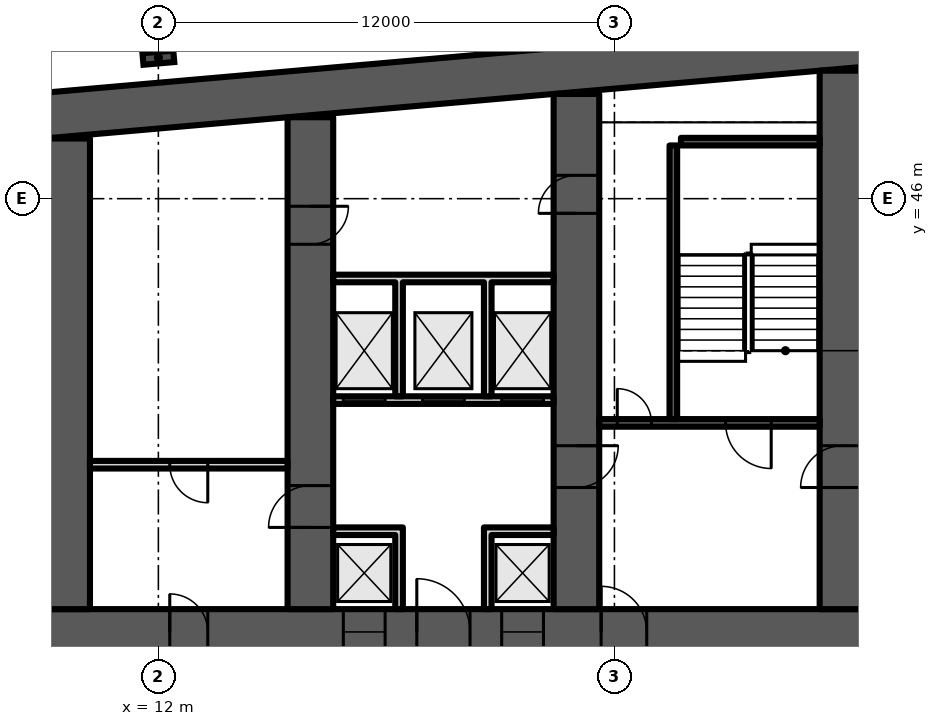
"""IFC4 building model, lengths in metres.
Left out: names, types, materials, properties, quantities, classifications, styles, units other than length and angle.
Written with IfcOpenShell. Run it as: python <this file> out.ifc"""

import sys

from ifc_helpers import new_model, si_unit, direction, frame, frame_2d, origin, origin_2d, place, context, subcontext, project, spatial, polyline, rectangle, i_section, outline, extrude, element, fill, save


model = new_model("IFC4")
c1 = context("Model", 3, precision=1e-05, world=origin(), true_north=direction((0.0, 1.0)))
c2 = subcontext(c1, "Body", "Model", "MODEL_VIEW")
j1 = project(units=[si_unit("LENGTHUNIT", "METRE"), si_unit("PLANEANGLEUNIT", "RADIAN")], contexts=[c1])
p1 = place(None, origin())
s1 = spatial("IfcSite", under=j1, at=p1, CompositionType="ELEMENT")
p2 = place(p1, origin())
s2 = spatial("IfcBuilding", under=s1, at=p2, CompositionType="ELEMENT")
p3 = place(p2, frame((0.0, 0.0, 63.1)))
s3 = spatial("IfcBuildingStorey", under=s2, at=p3, CompositionType="ELEMENT", Elevation=63.1)
p4 = place(p3, frame((0.0, 0.0, -0.0)))
e1 = element("IfcWall", 1, at=p4, inside=s3, PredefinedType="SHEAR", context=c2, shape_type="SweptSolid", body=[
    extrude(outline(polyline([(9.0, 47.583), (37.0, 50.032), (65.0, 47.583), (65.0, 48.787), (37.0, 51.237), (9.0, 48.787), (9.0, 47.583)])), origin(), (0.0, 0.0, 1.0), 3.6),
])
p5 = place(p3, frame((9.0, 34.6, 0.0), z_axis=(0.0, 0.0, 1.0), x_axis=(1.0, 0.0, 0.0)))
e2 = element("IfcWall", 2, at=p5, inside=s3, PredefinedType="SHEAR", context=c2, shape_type="SweptSolid", body=[
    extrude(rectangle(XDim=56.0, YDim=1.2, at=frame_2d((28.0, 0.0))), origin(), (0.0, 0.0, 1.0), 3.6),
])
p6 = place(p5, frame((3.3, 0.0, 0.0)))
e3 = element("IfcOpeningElement", 3, at=p6, cuts=e2, PredefinedType="OPENING", context=c2, shape_type="SweptSolid", body=[
    extrude(rectangle(XDim=1.0, YDim=2.1, at=frame_2d((0.5, 1.05))), frame((0.0, 0.61, 0.0), z_axis=(0.0, -1.0, 0.0), x_axis=(1.0, 0.0, 0.0)), (0.0, 0.0, 1.0), 1.22),
])
p7 = place(p5, frame((7.867, 0.0, 0.0)))
e4 = element("IfcOpeningElement", 4, at=p7, cuts=e2, PredefinedType="OPENING", context=c2, shape_type="SweptSolid", body=[
    extrude(rectangle(XDim=1.1, YDim=2.1, at=frame_2d((0.55, 1.05))), frame((0.0, 0.61, 0.0), z_axis=(0.0, -1.0, 0.0), x_axis=(1.0, 0.0, 0.0)), (0.0, 0.0, 1.0), 1.22),
])
p8 = place(p5, frame((12.033, 0.0, 0.0)))
e5 = element("IfcOpeningElement", 5, at=p8, cuts=e2, PredefinedType="OPENING", context=c2, shape_type="SweptSolid", body=[
    extrude(rectangle(XDim=1.1, YDim=2.1, at=frame_2d((0.55, 1.05))), frame((0.0, 0.61, 0.0), z_axis=(0.0, -1.0, 0.0), x_axis=(1.0, 0.0, 0.0)), (0.0, 0.0, 1.0), 1.22),
])
p9 = place(p5, frame((9.8, 0.0, 0.0)))
e6 = element("IfcOpeningElement", 6, at=p9, cuts=e2, PredefinedType="OPENING", context=c2, shape_type="SweptSolid", body=[
    extrude(rectangle(XDim=1.4, YDim=2.1, at=frame_2d((0.7, 1.05))), frame((0.0, 0.61, 0.0), z_axis=(0.0, -1.0, 0.0), x_axis=(1.0, 0.0, 0.0)), (0.0, 0.0, 1.0), 1.22),
])
p10 = place(p5, frame((14.65, 0.0, 0.0)))
e7 = element("IfcOpeningElement", 7, at=p10, cuts=e2, PredefinedType="OPENING", context=c2, shape_type="SweptSolid", body=[
    extrude(rectangle(XDim=1.2, YDim=2.1, at=frame_2d((0.6, 1.05))), frame((0.0, 0.61, 0.0), z_axis=(0.0, -1.0, 0.0), x_axis=(1.0, 0.0, 0.0)), (0.0, 0.0, 1.0), 1.22),
])
p11 = place(p5, frame((21.867, 0.0, 0.0)))
e8 = element("IfcOpeningElement", 8, at=p11, cuts=e2, PredefinedType="OPENING", context=c2, shape_type="SweptSolid", body=[
    extrude(rectangle(XDim=1.1, YDim=2.1, at=frame_2d((0.55, 1.05))), frame((0.0, 0.61, 0.0), z_axis=(0.0, -1.0, 0.0), x_axis=(1.0, 0.0, 0.0)), (0.0, 0.0, 1.0), 1.22),
])
p12 = place(p5, frame((26.033, 0.0, 0.0)))
e9 = element("IfcOpeningElement", 9, at=p12, cuts=e2, PredefinedType="OPENING", context=c2, shape_type="SweptSolid", body=[
    extrude(rectangle(XDim=1.1, YDim=2.1, at=frame_2d((0.55, 1.05))), frame((0.0, 0.61, 0.0), z_axis=(0.0, -1.0, 0.0), x_axis=(1.0, 0.0, 0.0)), (0.0, 0.0, 1.0), 1.22),
])
p13 = place(p5, frame((23.8, 0.0, 0.0)))
e10 = element("IfcOpeningElement", 10, at=p13, cuts=e2, PredefinedType="OPENING", context=c2, shape_type="SweptSolid", body=[
    extrude(rectangle(XDim=1.4, YDim=2.1, at=frame_2d((0.7, 1.05))), frame((0.0, 0.61, 0.0), z_axis=(0.0, -1.0, 0.0), x_axis=(1.0, 0.0, 0.0)), (0.0, 0.0, 1.0), 1.22),
])
p14 = place(p5, frame((28.867, 0.0, 0.0)))
e11 = element("IfcOpeningElement", 11, at=p14, cuts=e2, PredefinedType="OPENING", context=c2, shape_type="SweptSolid", body=[
    extrude(rectangle(XDim=1.1, YDim=2.1, at=frame_2d((0.55, 1.05))), frame((0.0, 0.61, 0.0), z_axis=(0.0, -1.0, 0.0), x_axis=(1.0, 0.0, 0.0)), (0.0, 0.0, 1.0), 1.22),
])
p15 = place(p5, frame((33.033, 0.0, 0.0)))
e12 = element("IfcOpeningElement", 12, at=p15, cuts=e2, PredefinedType="OPENING", context=c2, shape_type="SweptSolid", body=[
    extrude(rectangle(XDim=1.1, YDim=2.1, at=frame_2d((0.55, 1.05))), frame((0.0, 0.61, 0.0), z_axis=(0.0, -1.0, 0.0), x_axis=(1.0, 0.0, 0.0)), (0.0, 0.0, 1.0), 1.22),
])
p16 = place(p5, frame((40.15, 0.0, 0.0)))
e13 = element("IfcOpeningElement", 13, at=p16, cuts=e2, PredefinedType="OPENING", context=c2, shape_type="SweptSolid", body=[
    extrude(rectangle(XDim=1.2, YDim=2.1, at=frame_2d((0.6, 1.05))), frame((0.0, 0.61, 0.0), z_axis=(0.0, -1.0, 0.0), x_axis=(1.0, 0.0, 0.0)), (0.0, 0.0, 1.0), 1.22),
])
p17 = place(p5, frame((44.8, 0.0, 0.0)))
e14 = element("IfcOpeningElement", 14, at=p17, cuts=e2, PredefinedType="OPENING", context=c2, shape_type="SweptSolid", body=[
    extrude(rectangle(XDim=1.4, YDim=2.1, at=frame_2d((0.7, 1.05))), frame((0.0, 0.61, 0.0), z_axis=(0.0, -1.0, 0.0), x_axis=(1.0, 0.0, 0.0)), (0.0, 0.0, 1.0), 1.22),
])
p18 = place(p5, frame((49.867, 0.0, 0.0)))
e15 = element("IfcOpeningElement", 15, at=p18, cuts=e2, PredefinedType="OPENING", context=c2, shape_type="SweptSolid", body=[
    extrude(rectangle(XDim=1.1, YDim=2.1, at=frame_2d((0.55, 1.05))), frame((0.0, 0.61, 0.0), z_axis=(0.0, -1.0, 0.0), x_axis=(1.0, 0.0, 0.0)), (0.0, 0.0, 1.0), 1.22),
])
p19 = place(p5, frame((53.5, 0.0, 0.0)))
e16 = element("IfcOpeningElement", 16, at=p19, cuts=e2, PredefinedType="OPENING", context=c2, shape_type="SweptSolid", body=[
    extrude(rectangle(XDim=1.1, YDim=2.1, at=frame_2d((0.55, 1.05))), frame((0.0, 0.61, 0.0), z_axis=(0.0, -1.0, 0.0), x_axis=(1.0, 0.0, 0.0)), (0.0, 0.0, 1.0), 1.22),
])
p20 = place(p5, frame((51.567, 0.0, 0.0)))
e17 = element("IfcOpeningElement", 17, at=p20, cuts=e2, PredefinedType="OPENING", context=c2, shape_type="SweptSolid", body=[
    extrude(rectangle(XDim=1.4, YDim=2.1, at=frame_2d((0.7, 1.05))), frame((0.0, 0.61, 0.0), z_axis=(0.0, -1.0, 0.0), x_axis=(1.0, 0.0, 0.0)), (0.0, 0.0, 1.0), 1.22),
])
p21 = place(p3, frame((9.6, 35.2, 0.0), z_axis=(0.0, 0.0, 1.0), x_axis=(0.0, 1.0, 0.0)))
e18 = element("IfcWall", 18, at=p21, inside=s3, PredefinedType="SHEAR", context=c2, shape_type="SweptSolid", body=[
    extrude(rectangle(XDim=12.383, YDim=1.2, at=frame_2d((6.191, 0.0))), origin(), (0.0, 0.0, 1.0), 3.6),
])
p22 = place(p3, frame((16.0, 35.2, 0.0), z_axis=(0.0, 0.0, 1.0), x_axis=(0.0, 1.0, 0.0)))
e19 = element("IfcWall", 19, at=p22, inside=s3, PredefinedType="SHEAR", context=c2, shape_type="SweptSolid", body=[
    extrude(rectangle(XDim=12.943, YDim=1.2, at=frame_2d((6.471, 0.0))), origin(), (0.0, 0.0, 1.0), 3.6),
])
p23 = place(p22, frame((2.15, 0.0, 0.0)))
e20 = element("IfcOpeningElement", 20, at=p23, cuts=e19, PredefinedType="OPENING", context=c2, shape_type="SweptSolid", body=[
    extrude(rectangle(XDim=1.1, YDim=2.1, at=frame_2d((0.55, 1.05))), frame((0.0, 0.61, 0.0), z_axis=(0.0, -1.0, 0.0), x_axis=(1.0, 0.0, 0.0)), (0.0, 0.0, 1.0), 1.22),
])
p24 = place(p22, frame((9.6, 0.0, 0.0)))
e21 = element("IfcOpeningElement", 21, at=p24, cuts=e19, PredefinedType="OPENING", context=c2, shape_type="SweptSolid", body=[
    extrude(rectangle(XDim=1.0, YDim=2.1, at=frame_2d((0.5, 1.05))), frame((0.0, 0.61, 0.0), z_axis=(0.0, -1.0, 0.0), x_axis=(1.0, 0.0, 0.0)), (0.0, 0.0, 1.0), 1.22),
])
p25 = place(p3, frame((23.0, 35.2, 0.0), z_axis=(0.0, 0.0, 1.0), x_axis=(0.0, 1.0, 0.0)))
e22 = element("IfcWall", 22, at=p25, inside=s3, PredefinedType="SHEAR", context=c2, shape_type="SweptSolid", body=[
    extrude(rectangle(XDim=13.555, YDim=1.2, at=frame_2d((6.778, 0.0))), origin(), (0.0, 0.0, 1.0), 3.6),
])
p26 = place(p25, frame((10.414, 0.0, 0.0)))
e23 = element("IfcOpeningElement", 23, at=p26, cuts=e22, PredefinedType="OPENING", context=c2, shape_type="SweptSolid", body=[
    extrude(rectangle(XDim=1.0, YDim=2.1, at=frame_2d((0.5, 1.05))), frame((0.0, 0.61, 0.0), z_axis=(0.0, -1.0, 0.0), x_axis=(1.0, 0.0, 0.0)), (0.0, 0.0, 1.0), 1.22),
])
p27 = place(p25, frame((3.2, 0.0, 0.0)))
e24 = element("IfcOpeningElement", 24, at=p27, cuts=e22, PredefinedType="OPENING", context=c2, shape_type="SweptSolid", body=[
    extrude(rectangle(XDim=1.1, YDim=2.1, at=frame_2d((0.55, 1.05))), frame((0.0, 0.61, 0.0), z_axis=(0.0, -1.0, 0.0), x_axis=(1.0, 0.0, 0.0)), (0.0, 0.0, 1.0), 1.22),
])
p28 = place(p3, frame((30.0, 35.2, 0.0), z_axis=(0.0, 0.0, 1.0), x_axis=(0.0, 1.0, 0.0)))
e25 = element("IfcWall", 25, at=p28, inside=s3, PredefinedType="SHEAR", context=c2, shape_type="SweptSolid", body=[
    extrude(rectangle(XDim=14.168, YDim=1.2, at=frame_2d((7.084, 0.0))), origin(), (0.0, 0.0, 1.0), 3.6),
])
p29 = place(p28, frame((3.2, 0.0, 0.0)))
e26 = element("IfcOpeningElement", 26, at=p29, cuts=e25, PredefinedType="OPENING", context=c2, shape_type="SweptSolid", body=[
    extrude(rectangle(XDim=1.1, YDim=2.1, at=frame_2d((0.55, 1.05))), frame((0.0, 0.61, 0.0), z_axis=(0.0, -1.0, 0.0), x_axis=(1.0, 0.0, 0.0)), (0.0, 0.0, 1.0), 1.22),
])
p30 = place(p3, frame((12.0, 49.71, 0.0), z_axis=(0.0, 0.0, 1.0), x_axis=(-0.087156, 0.996197, 0.0)))
e27 = element("IfcColumn", 27, at=p30, inside=s3, PredefinedType="COLUMN", context=c2, shape_type="SweptSolid", body=[
    extrude(i_section(OverallWidth=0.303, OverallDepth=0.814, WebThickness=0.021, FlangeThickness=0.04, FilletRadius=0.03, at=origin_2d()), origin(), (0.0, 0.0, 1.0), 3.6),
])
p31 = place(p3, frame((10.2, 39.0, 0.0), z_axis=(0.0, 0.0, 1.0), x_axis=(1.0, 0.0, 0.0)))
e28 = element("IfcWall", 28, at=p31, inside=s3, PredefinedType="PARTITIONING", context=c2, shape_type="SweptSolid", body=[
    extrude(rectangle(XDim=5.2, YDim=0.2, at=frame_2d((2.6, 0.0))), origin(), (0.0, 0.0, 1.0), 3.2),
])
p32 = place(p31, frame((2.1, 0.0, 0.0)))
e29 = element("IfcOpeningElement", 29, at=p32, cuts=e28, PredefinedType="OPENING", context=c2, shape_type="SweptSolid", body=[
    extrude(rectangle(XDim=1.0, YDim=2.1, at=frame_2d((0.5, 1.05))), frame((0.0, 0.11, 0.0), z_axis=(0.0, -1.0, 0.0), x_axis=(1.0, 0.0, 0.0)), (0.0, 0.0, 1.0), 0.22),
])
p33 = place(p3, frame((16.6, 40.7, 0.0), z_axis=(0.0, 0.0, 1.0), x_axis=(1.0, 0.0, 0.0)))
e30 = element("IfcWall", 30, at=p33, inside=s3, PredefinedType="PARTITIONING", context=c2, shape_type="SweptSolid", body=[
    extrude(rectangle(XDim=5.8, YDim=0.2, at=frame_2d((2.9, 0.0))), origin(), (0.0, 0.0, 1.0), 3.2),
])
p34 = place(p33, frame((0.267, 0.0, 0.0)))
e31 = element("IfcOpeningElement", 31, at=p34, cuts=e30, PredefinedType="OPENING", context=c2, shape_type="SweptSolid", body=[
    extrude(rectangle(XDim=1.1, YDim=2.1, at=frame_2d((0.55, 1.05))), frame((0.0, 0.11, 0.0), z_axis=(0.0, -1.0, 0.0), x_axis=(1.0, 0.0, 0.0)), (0.0, 0.0, 1.0), 0.22),
])
p35 = place(p33, frame((2.35, 0.0, 0.0)))
e32 = element("IfcOpeningElement", 32, at=p35, cuts=e30, PredefinedType="OPENING", context=c2, shape_type="SweptSolid", body=[
    extrude(rectangle(XDim=1.1, YDim=2.1, at=frame_2d((0.55, 1.05))), frame((0.0, 0.11, 0.0), z_axis=(0.0, -1.0, 0.0), x_axis=(1.0, 0.0, 0.0)), (0.0, 0.0, 1.0), 0.22),
])
p36 = place(p33, frame((4.433, 0.0, 0.0)))
e33 = element("IfcOpeningElement", 33, at=p36, cuts=e30, PredefinedType="OPENING", context=c2, shape_type="SweptSolid", body=[
    extrude(rectangle(XDim=1.1, YDim=2.1, at=frame_2d((0.55, 1.05))), frame((0.0, 0.11, 0.0), z_axis=(0.0, -1.0, 0.0), x_axis=(1.0, 0.0, 0.0)), (0.0, 0.0, 1.0), 0.22),
])
p37 = place(p3, frame((0.0, 0.0, -0.0)))
e34 = element("IfcWall", 34, at=p37, inside=s3, PredefinedType="PARTITIONING", context=c2, shape_type="SweptSolid", body=[
    extrude(outline(polyline([(18.233, 37.15), (16.6, 37.15), (16.6, 37.35), (18.233, 37.35), (18.433, 37.35), (18.433, 35.2), (18.233, 35.2), (18.233, 37.15)])), origin(), (0.0, 0.0, 1.0), 3.2),
])
p38 = place(p3, frame((0.0, 0.0, -0.0)))
e35 = element("IfcWall", 35, at=p38, inside=s3, PredefinedType="PARTITIONING", context=c2, shape_type="SweptSolid", body=[
    extrude(outline(polyline([(20.567, 37.35), (20.767, 37.35), (22.4, 37.35), (22.4, 37.15), (20.767, 37.15), (20.767, 35.2), (20.567, 35.2), (20.567, 37.35)])), origin(), (0.0, 0.0, 1.0), 3.2),
])
p39 = place(p3, frame((0.0, 0.0, -0.0)))
e36 = element("IfcWall", 36, at=p39, inside=s3, PredefinedType="PARTITIONING", context=c2, shape_type="SweptSolid", body=[
    extrude(outline(polyline([(18.433, 40.8), (18.233, 40.8), (18.233, 43.8), (16.6, 43.8), (16.6, 44.0), (22.4, 44.0), (22.4, 43.8), (20.767, 43.8), (20.767, 40.8), (20.567, 40.8), (20.567, 43.8), (18.433, 43.8), (18.433, 40.8)])), origin(), (0.0, 0.0, 1.0), 3.2),
])
p40 = place(p3, frame((23.6, 40.1, 0.0), z_axis=(0.0, 0.0, 1.0), x_axis=(1.0, 0.0, 0.0)))
e37 = element("IfcWall", 37, at=p40, inside=s3, PredefinedType="SHEAR", context=c2, shape_type="SweptSolid", body=[
    extrude(rectangle(XDim=5.8, YDim=0.2, at=frame_2d((2.9, 0.0))), origin(), (0.0, 0.0, 1.0), 3.2),
])
p41 = place(p40, frame((3.325, 0.0, 0.0)))
e38 = element("IfcOpeningElement", 38, at=p41, cuts=e37, PredefinedType="OPENING", context=c2, shape_type="SweptSolid", body=[
    extrude(rectangle(XDim=1.2, YDim=2.1, at=frame_2d((0.6, 1.05))), frame((0.0, 0.11, 0.0), z_axis=(0.0, -1.0, 0.0), x_axis=(1.0, 0.0, 0.0)), (0.0, 0.0, 1.0), 0.22),
])
p42 = place(p40, frame((0.475, 0.0, 0.0)))
e39 = element("IfcOpeningElement", 39, at=p42, cuts=e37, PredefinedType="OPENING", context=c2, shape_type="SweptSolid", body=[
    extrude(rectangle(XDim=0.9, YDim=2.1, at=frame_2d((0.45, 1.05))), frame((0.0, 0.11, 0.0), z_axis=(0.0, -1.0, 0.0), x_axis=(1.0, 0.0, 0.0)), (0.0, 0.0, 1.0), 0.22),
])
p43 = place(p3, frame((25.55, 40.2, 0.0), z_axis=(0.0, 0.0, 1.0), x_axis=(0.0, 1.0, 0.0)))
e40 = element("IfcWall", 40, at=p43, inside=s3, PredefinedType="SHEAR", context=c2, shape_type="SweptSolid", body=[
    extrude(rectangle(XDim=7.2, YDim=0.2, at=frame_2d((3.6, 0.0))), origin(), (0.0, 0.0, 1.0), 3.2),
])
p44 = place(p3, frame((25.75, 47.5, 0.0), z_axis=(0.0, 0.0, 1.0), x_axis=(1.0, 0.0, 0.0)))
e41 = element("IfcWall", 41, at=p44, inside=s3, PredefinedType="SHEAR", context=c2, shape_type="SweptSolid", body=[
    extrude(rectangle(XDim=3.65, YDim=0.2, at=frame_2d((1.825, 0.0))), origin(), (0.0, 0.0, 1.0), 3.2),
])
p45 = place(p6, origin())
e42 = element("IfcDoor", 42, at=p45, inside=s3, OperationType="SINGLE_SWING_LEFT", PredefinedType="DOOR", context=c2, shape_type="SweptSolid", body=[
    extrude(rectangle(XDim=1.0, YDim=2.1, at=frame_2d((0.5, 1.05))), frame((0.0, 0.6, 0.0), z_axis=(0.0, -1.0, 0.0), x_axis=(1.0, 0.0, 0.0)), (0.0, 0.0, 1.0), 1.199),
])
fill(e3, e42)
p46 = place(p32, origin())
e43 = element("IfcDoor", 43, at=p46, inside=s3, OperationType="SINGLE_SWING_RIGHT", PredefinedType="DOOR", context=c2, shape_type="SweptSolid", body=[
    extrude(rectangle(XDim=1.0, YDim=2.1, at=frame_2d((0.5, 1.05))), frame((0.0, 0.025, 0.0), z_axis=(0.0, -1.0, 0.0), x_axis=(1.0, 0.0, 0.0)), (0.0, 0.0, 1.0), 0.05),
])
fill(e29, e43)
p47 = place(p7, origin())
e44 = element("IfcDoor", 44, at=p47, inside=s3, OperationType="DOUBLE_DOOR_SLIDING", PredefinedType="DOOR", context=c2, shape_type="SweptSolid", body=[
    extrude(rectangle(XDim=1.1, YDim=2.1, at=frame_2d((0.55, 1.05))), frame((0.0, 0.025, 0.0), z_axis=(0.0, -1.0, 0.0), x_axis=(1.0, 0.0, 0.0)), (0.0, 0.0, 1.0), 0.05),
])
fill(e4, e44)
p48 = place(p8, origin())
e45 = element("IfcDoor", 45, at=p48, inside=s3, OperationType="DOUBLE_DOOR_SLIDING", PredefinedType="DOOR", context=c2, shape_type="SweptSolid", body=[
    extrude(rectangle(XDim=1.1, YDim=2.1, at=frame_2d((0.55, 1.05))), frame((0.0, 0.025, 0.0), z_axis=(0.0, -1.0, 0.0), x_axis=(1.0, 0.0, 0.0)), (0.0, 0.0, 1.0), 0.05),
])
fill(e5, e45)
p49 = place(p9, origin())
e46 = element("IfcDoor", 46, at=p49, inside=s3, OperationType="DOUBLE_DOOR_SINGLE_SWING", PredefinedType="DOOR", context=c2, shape_type="SweptSolid", body=[
    extrude(rectangle(XDim=1.4, YDim=2.1, at=frame_2d((0.7, 1.05))), frame((0.0, 0.025, 0.0), z_axis=(0.0, -1.0, 0.0), x_axis=(1.0, 0.0, 0.0)), (0.0, 0.0, 1.0), 0.05),
])
fill(e6, e46)
p50 = place(p34, origin())
e47 = element("IfcDoor", 47, at=p50, inside=s3, OperationType="DOUBLE_DOOR_SLIDING", PredefinedType="DOOR", context=c2, shape_type="SweptSolid", body=[
    extrude(rectangle(XDim=1.1, YDim=2.1, at=frame_2d((0.55, 1.05))), frame((0.0, 0.025, 0.0), z_axis=(0.0, -1.0, 0.0), x_axis=(1.0, 0.0, 0.0)), (0.0, 0.0, 1.0), 0.05),
])
fill(e31, e47)
p51 = place(p35, origin())
e48 = element("IfcDoor", 48, at=p51, inside=s3, OperationType="DOUBLE_DOOR_SLIDING", PredefinedType="DOOR", context=c2, shape_type="SweptSolid", body=[
    extrude(rectangle(XDim=1.1, YDim=2.1, at=frame_2d((0.55, 1.05))), frame((0.0, 0.025, 0.0), z_axis=(0.0, -1.0, 0.0), x_axis=(1.0, 0.0, 0.0)), (0.0, 0.0, 1.0), 0.05),
])
fill(e32, e48)
p52 = place(p36, origin())
e49 = element("IfcDoor", 49, at=p52, inside=s3, OperationType="DOUBLE_DOOR_SLIDING", PredefinedType="DOOR", context=c2, shape_type="SweptSolid", body=[
    extrude(rectangle(XDim=1.1, YDim=2.1, at=frame_2d((0.55, 1.05))), frame((0.0, 0.025, 0.0), z_axis=(0.0, -1.0, 0.0), x_axis=(1.0, 0.0, 0.0)), (0.0, 0.0, 1.0), 0.05),
])
fill(e33, e49)
p53 = place(p26, origin())
e50 = element("IfcDoor", 50, at=p53, inside=s3, OperationType="SINGLE_SWING_LEFT", PredefinedType="DOOR", context=c2, shape_type="SweptSolid", body=[
    extrude(rectangle(XDim=1.0, YDim=2.1, at=frame_2d((0.5, 1.05))), frame((0.0, 0.6, 0.0), z_axis=(0.0, -1.0, 0.0), x_axis=(1.0, 0.0, 0.0)), (0.0, 0.0, 1.0), 1.199),
])
fill(e23, e50)
p54 = place(p41, origin())
e51 = element("IfcDoor", 51, at=p54, inside=s3, OperationType="SINGLE_SWING_RIGHT", PredefinedType="DOOR", context=c2, shape_type="SweptSolid", body=[
    extrude(rectangle(XDim=1.2, YDim=2.1, at=frame_2d((0.6, 1.05))), frame((0.0, 0.025, 0.0), z_axis=(0.0, -1.0, 0.0), x_axis=(1.0, 0.0, 0.0)), (0.0, 0.0, 1.0), 0.05),
])
fill(e38, e51)
p55 = place(p42, origin())
e52 = element("IfcDoor", 52, at=p55, inside=s3, OperationType="SINGLE_SWING_LEFT", PredefinedType="DOOR", context=c2, shape_type="SweptSolid", body=[
    extrude(rectangle(XDim=0.9, YDim=2.1, at=frame_2d((0.45, 1.05))), frame((0.0, 0.025, 0.0), z_axis=(0.0, -1.0, 0.0), x_axis=(1.0, 0.0, 0.0)), (0.0, 0.0, 1.0), 0.05),
])
fill(e39, e52)
p56 = place(p10, origin())
e53 = element("IfcDoor", 53, at=p56, inside=s3, OperationType="SINGLE_SWING_LEFT", PredefinedType="DOOR", context=c2, shape_type="SweptSolid", body=[
    extrude(rectangle(XDim=1.2, YDim=2.1, at=frame_2d((0.6, 1.05))), frame((0.0, 0.025, 0.0), z_axis=(0.0, -1.0, 0.0), x_axis=(1.0, 0.0, 0.0)), (0.0, 0.0, 1.0), 0.05),
])
fill(e7, e53)
p57 = place(p23, origin())
e54 = element("IfcDoor", 54, at=p57, inside=s3, OperationType="SINGLE_SWING_LEFT", PredefinedType="DOOR", context=c2, shape_type="SweptSolid", body=[
    extrude(rectangle(XDim=1.1, YDim=2.1, at=frame_2d((0.55, 1.05))), frame((0.0, 0.025, 0.0), z_axis=(0.0, -1.0, 0.0), x_axis=(1.0, 0.0, 0.0)), (0.0, 0.0, 1.0), 0.05),
])
fill(e20, e54)
p58 = place(p24, origin())
e55 = element("IfcDoor", 55, at=p58, inside=s3, OperationType="SINGLE_SWING_RIGHT", PredefinedType="DOOR", context=c2, shape_type="SweptSolid", body=[
    extrude(rectangle(XDim=1.0, YDim=2.1, at=frame_2d((0.5, 1.05))), frame((0.0, 0.6, 0.0), z_axis=(0.0, -1.0, 0.0), x_axis=(1.0, 0.0, 0.0)), (0.0, 0.0, 1.0), 1.199),
])
fill(e21, e55)
p59 = place(p27, origin())
e56 = element("IfcDoor", 56, at=p59, inside=s3, OperationType="SINGLE_SWING_RIGHT", PredefinedType="DOOR", context=c2, shape_type="SweptSolid", body=[
    extrude(rectangle(XDim=1.1, YDim=2.1, at=frame_2d((0.55, 1.05))), frame((0.0, 0.025, 0.0), z_axis=(0.0, -1.0, 0.0), x_axis=(1.0, 0.0, 0.0)), (0.0, 0.0, 1.0), 0.05),
])
fill(e24, e56)
p60 = place(p29, origin())
e57 = element("IfcDoor", 57, at=p60, inside=s3, OperationType="SINGLE_SWING_LEFT", PredefinedType="DOOR", context=c2, shape_type="SweptSolid", body=[
    extrude(rectangle(XDim=1.1, YDim=2.1, at=frame_2d((0.55, 1.05))), frame((0.0, 0.025, 0.0), z_axis=(0.0, -1.0, 0.0), x_axis=(1.0, 0.0, 0.0)), (0.0, 0.0, 1.0), 0.05),
])
fill(e26, e57)
save(model, sys.argv[1])
